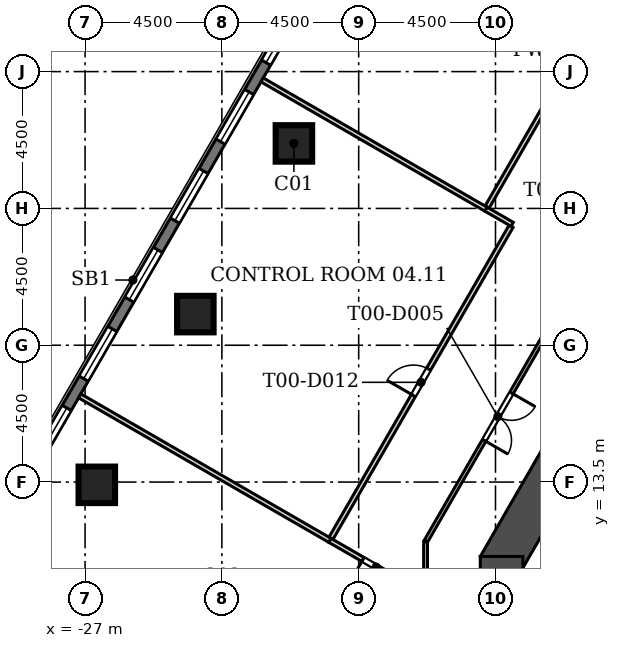
"""IFC4 building model, lengths in metres.
Left out: names, types, materials, properties, quantities, classifications, styles, units other than length and angle.
Written with IfcOpenShell. Run it as: python <this file> out.ifc"""

import sys

from ifc_helpers import new_model, si_unit, direction, frame, frame_2d, origin, origin_2d, place, context, subcontext, project, spatial, rectangle, extrude, element, fill, save


model = new_model("IFC4")
c1 = context("Model", 3, precision=1e-05, world=origin(), true_north=direction((0.0, 1.0)))
c2 = subcontext(c1, "Body", "Model", "MODEL_VIEW")
j1 = project(units=[si_unit("LENGTHUNIT", "METRE"), si_unit("PLANEANGLEUNIT", "RADIAN")], contexts=[c1])
p1 = place(None, origin())
s1 = spatial("IfcSite", under=j1, at=p1, CompositionType="ELEMENT")
p2 = place(p1, origin())
s2 = spatial("IfcBuilding", under=s1, at=p2, CompositionType="ELEMENT")
p3 = place(p2, frame((0.0, 0.0, 25.0)))
s3 = spatial("IfcBuildingStorey", under=s2, at=p3, CompositionType="ELEMENT", Elevation=25.0)
for number, where, z_axis, x_axis in (
    (1, (-20.131, 24.638, 0.0), (0.0, 0.0, 1.0), (1.0, 0.0, 0.0)),
    (2, (-23.373, 19.024, 0.0), (0.0, 0.0, 1.0), (1.0, 0.0, 0.0)),
    (3, (-26.614, 13.409, 0.0), (0.0, 0.0, 1.0), (1.0, 0.0, 0.0)),
):
    element("IfcColumn", number, at=place(p3, frame(where, z_axis=z_axis, x_axis=x_axis)), inside=s3, PredefinedType="COLUMN", context=c2, shape_type="SweptSolid", body=[
        extrude(rectangle(XDim=1.2, YDim=1.2, at=origin_2d()), origin(), (0.0, 0.0, 1.0), 4.5),
    ])
p4 = place(p3, frame((-8.805, 18.65, 0.0), z_axis=(0.0, 0.0, 1.0), x_axis=(-0.50000187635, -0.866024320471, 0.0)))
e4 = element("IfcWall", 4, at=p4, inside=s3, PredefinedType="SHEAR", context=c2, shape_type="SweptSolid", body=[
    extrude(rectangle(XDim=9.177, YDim=1.4, at=frame_2d((4.588, 0.0))), origin(), (0.0, 0.0, 1.0), 4.5),
])
p5 = place(p3, frame((-13.3, 11.052, 0.0), z_axis=(0.0, 0.0, 1.0), x_axis=(0.0, -1.0, 0.0)))
e5 = element("IfcWall", 5, at=p5, inside=s3, PredefinedType="SHEAR", context=c2, shape_type="SweptSolid", body=[
    extrude(rectangle(XDim=10.202, YDim=1.4, at=frame_2d((5.101, 0.0))), origin(), (0.0, 0.0, 1.0), 4.5),
])
p6 = place(p5, frame((5.453, 0.0, 0.0)))
e6 = element("IfcOpeningElement", 6, at=p6, cuts=e5, PredefinedType="OPENING", context=c2, shape_type="SweptSolid", body=[
    extrude(rectangle(XDim=1.2, YDim=2.1, at=frame_2d((0.6, 1.05))), frame((0.0, 0.71, 0.0), z_axis=(0.0, -1.0, 0.0), x_axis=(1.0, 0.0, 0.0)), (0.0, 0.0, 1.0), 1.42),
])
p7 = place(p5, frame((1.453, 0.0, 0.0)))
e7 = element("IfcOpeningElement", 7, at=p7, cuts=e5, PredefinedType="OPENING", context=c2, shape_type="SweptSolid", body=[
    extrude(rectangle(XDim=1.2, YDim=2.1, at=frame_2d((0.6, 1.05))), frame((0.0, 0.71, 0.0), z_axis=(0.0, -1.0, 0.0), x_axis=(1.0, 0.0, 0.0)), (0.0, 0.0, 1.0), 1.42),
])
p8 = place(p3, frame((-4.353, 56.207, 0.0), z_axis=(0.0, 0.0, 1.0), x_axis=(-0.500000836325, -0.866024920931, 0.0)))
e8 = element("IfcWall", 8, at=p8, inside=s3, PredefinedType="SOLIDWALL", context=c2, shape_type="SweptSolid", body=[
    extrude(rectangle(XDim=56.0, YDim=0.34, at=frame_2d((28.0, 0.0))), origin(), (0.0, 0.0, 1.0), 4.2),
])
p9 = place(p8, frame((1.5, 0.0, 0.9)))
e9 = element("IfcOpeningElement", 9, at=p9, cuts=e8, PredefinedType="OPENING", context=c2, shape_type="SweptSolid", body=[
    extrude(rectangle(XDim=1.885, YDim=3.0, at=frame_2d((0.942, 1.5))), frame((0.0, 0.18, 0.0), z_axis=(0.0, -1.0, 0.0), x_axis=(1.0, 0.0, 0.0)), (0.0, 0.0, 1.0), 0.36),
])
p10 = place(p8, frame((4.5, 0.0, 0.9)))
e10 = element("IfcOpeningElement", 10, at=p10, cuts=e8, PredefinedType="OPENING", context=c2, shape_type="SweptSolid", body=[
    extrude(rectangle(XDim=1.885, YDim=3.0, at=frame_2d((0.942, 1.5))), frame((0.0, 0.18, 0.0), z_axis=(0.0, -1.0, 0.0), x_axis=(1.0, 0.0, 0.0)), (0.0, 0.0, 1.0), 0.36),
])
p11 = place(p8, frame((7.5, 0.0, 0.9)))
e11 = element("IfcOpeningElement", 11, at=p11, cuts=e8, PredefinedType="OPENING", context=c2, shape_type="SweptSolid", body=[
    extrude(rectangle(XDim=1.885, YDim=3.0, at=frame_2d((0.942, 1.5))), frame((0.0, 0.18, 0.0), z_axis=(0.0, -1.0, 0.0), x_axis=(1.0, 0.0, 0.0)), (0.0, 0.0, 1.0), 0.36),
])
p12 = place(p8, frame((10.5, 0.0, 0.9)))
e12 = element("IfcOpeningElement", 12, at=p12, cuts=e8, PredefinedType="OPENING", context=c2, shape_type="SweptSolid", body=[
    extrude(rectangle(XDim=1.885, YDim=3.0, at=frame_2d((0.942, 1.5))), frame((0.0, 0.18, 0.0), z_axis=(0.0, -1.0, 0.0), x_axis=(1.0, 0.0, 0.0)), (0.0, 0.0, 1.0), 0.36),
])
p13 = place(p8, frame((13.5, 0.0, 0.9)))
e13 = element("IfcOpeningElement", 13, at=p13, cuts=e8, PredefinedType="OPENING", context=c2, shape_type="SweptSolid", body=[
    extrude(rectangle(XDim=1.885, YDim=3.0, at=frame_2d((0.942, 1.5))), frame((0.0, 0.18, 0.0), z_axis=(0.0, -1.0, 0.0), x_axis=(1.0, 0.0, 0.0)), (0.0, 0.0, 1.0), 0.36),
])
p14 = place(p8, frame((16.5, 0.0, 0.9)))
e14 = element("IfcOpeningElement", 14, at=p14, cuts=e8, PredefinedType="OPENING", context=c2, shape_type="SweptSolid", body=[
    extrude(rectangle(XDim=1.885, YDim=3.0, at=frame_2d((0.942, 1.5))), frame((0.0, 0.18, 0.0), z_axis=(0.0, -1.0, 0.0), x_axis=(1.0, 0.0, 0.0)), (0.0, 0.0, 1.0), 0.36),
])
p15 = place(p8, frame((19.5, 0.0, 0.9)))
e15 = element("IfcOpeningElement", 15, at=p15, cuts=e8, PredefinedType="OPENING", context=c2, shape_type="SweptSolid", body=[
    extrude(rectangle(XDim=1.885, YDim=3.0, at=frame_2d((0.942, 1.5))), frame((0.0, 0.18, 0.0), z_axis=(0.0, -1.0, 0.0), x_axis=(1.0, 0.0, 0.0)), (0.0, 0.0, 1.0), 0.36),
])
p16 = place(p8, frame((22.5, 0.0, 0.9)))
e16 = element("IfcOpeningElement", 16, at=p16, cuts=e8, PredefinedType="OPENING", context=c2, shape_type="SweptSolid", body=[
    extrude(rectangle(XDim=1.885, YDim=3.0, at=frame_2d((0.942, 1.5))), frame((0.0, 0.18, 0.0), z_axis=(0.0, -1.0, 0.0), x_axis=(1.0, 0.0, 0.0)), (0.0, 0.0, 1.0), 0.36),
])
p17 = place(p8, frame((25.5, 0.0, 0.0)))
e17 = element("IfcOpeningElement", 17, at=p17, cuts=e8, PredefinedType="OPENING", context=c2, shape_type="SweptSolid", body=[
    extrude(rectangle(XDim=1.885, YDim=2.6, at=frame_2d((0.942, 1.3))), frame((0.0, 0.18, 0.0), z_axis=(0.0, -1.0, 0.0), x_axis=(1.0, 0.0, 0.0)), (0.0, 0.0, 1.0), 0.36),
])
p18 = place(p8, frame((28.5, 0.0, 0.9)))
e18 = element("IfcOpeningElement", 18, at=p18, cuts=e8, PredefinedType="OPENING", context=c2, shape_type="SweptSolid", body=[
    extrude(rectangle(XDim=1.885, YDim=3.0, at=frame_2d((0.942, 1.5))), frame((0.0, 0.18, 0.0), z_axis=(0.0, -1.0, 0.0), x_axis=(1.0, 0.0, 0.0)), (0.0, 0.0, 1.0), 0.36),
])
p19 = place(p8, frame((31.5, 0.0, 0.9)))
e19 = element("IfcOpeningElement", 19, at=p19, cuts=e8, PredefinedType="OPENING", context=c2, shape_type="SweptSolid", body=[
    extrude(rectangle(XDim=1.885, YDim=3.0, at=frame_2d((0.942, 1.5))), frame((0.0, 0.18, 0.0), z_axis=(0.0, -1.0, 0.0), x_axis=(1.0, 0.0, 0.0)), (0.0, 0.0, 1.0), 0.36),
])
p20 = place(p8, frame((34.5, 0.0, 0.9)))
e20 = element("IfcOpeningElement", 20, at=p20, cuts=e8, PredefinedType="OPENING", context=c2, shape_type="SweptSolid", body=[
    extrude(rectangle(XDim=1.885, YDim=3.0, at=frame_2d((0.942, 1.5))), frame((0.0, 0.18, 0.0), z_axis=(0.0, -1.0, 0.0), x_axis=(1.0, 0.0, 0.0)), (0.0, 0.0, 1.0), 0.36),
])
p21 = place(p8, frame((37.5, 0.0, 0.9)))
e21 = element("IfcOpeningElement", 21, at=p21, cuts=e8, PredefinedType="OPENING", context=c2, shape_type="SweptSolid", body=[
    extrude(rectangle(XDim=1.885, YDim=3.0, at=frame_2d((0.942, 1.5))), frame((0.0, 0.18, 0.0), z_axis=(0.0, -1.0, 0.0), x_axis=(1.0, 0.0, 0.0)), (0.0, 0.0, 1.0), 0.36),
])
p22 = place(p8, frame((40.5, 0.0, 0.9)))
e22 = element("IfcOpeningElement", 22, at=p22, cuts=e8, PredefinedType="OPENING", context=c2, shape_type="SweptSolid", body=[
    extrude(rectangle(XDim=1.885, YDim=3.0, at=frame_2d((0.942, 1.5))), frame((0.0, 0.18, 0.0), z_axis=(0.0, -1.0, 0.0), x_axis=(1.0, 0.0, 0.0)), (0.0, 0.0, 1.0), 0.36),
])
p23 = place(p8, frame((43.5, 0.0, 0.9)))
e23 = element("IfcOpeningElement", 23, at=p23, cuts=e8, PredefinedType="OPENING", context=c2, shape_type="SweptSolid", body=[
    extrude(rectangle(XDim=1.885, YDim=3.0, at=frame_2d((0.942, 1.5))), frame((0.0, 0.18, 0.0), z_axis=(0.0, -1.0, 0.0), x_axis=(1.0, 0.0, 0.0)), (0.0, 0.0, 1.0), 0.36),
])
p24 = place(p8, frame((46.5, 0.0, 0.9)))
e24 = element("IfcOpeningElement", 24, at=p24, cuts=e8, PredefinedType="OPENING", context=c2, shape_type="SweptSolid", body=[
    extrude(rectangle(XDim=1.885, YDim=3.0, at=frame_2d((0.942, 1.5))), frame((0.0, 0.18, 0.0), z_axis=(0.0, -1.0, 0.0), x_axis=(1.0, 0.0, 0.0)), (0.0, 0.0, 1.0), 0.36),
])
p25 = place(p8, frame((49.5, 0.0, 0.9)))
e25 = element("IfcOpeningElement", 25, at=p25, cuts=e8, PredefinedType="OPENING", context=c2, shape_type="SweptSolid", body=[
    extrude(rectangle(XDim=1.885, YDim=3.0, at=frame_2d((0.942, 1.5))), frame((0.0, 0.18, 0.0), z_axis=(0.0, -1.0, 0.0), x_axis=(1.0, 0.0, 0.0)), (0.0, 0.0, 1.0), 0.36),
])
p26 = place(p8, frame((52.5, 0.0, 0.9)))
e26 = element("IfcOpeningElement", 26, at=p26, cuts=e8, PredefinedType="OPENING", context=c2, shape_type="SweptSolid", body=[
    extrude(rectangle(XDim=1.885, YDim=3.0, at=frame_2d((0.942, 1.5))), frame((0.0, 0.18, 0.0), z_axis=(0.0, -1.0, 0.0), x_axis=(1.0, 0.0, 0.0)), (0.0, 0.0, 1.0), 0.36),
])
p27 = place(p3, frame((-15.8, 9.766, 0.0), z_axis=(0.0, 0.0, 1.0), x_axis=(0.0, 1.0, 0.0)))
e27 = element("IfcWall", 27, at=p27, inside=s3, PredefinedType="PARTITIONING", context=c2, shape_type="SweptSolid", body=[
    extrude(rectangle(XDim=1.769, YDim=0.125, at=frame_2d((0.885, 0.0))), origin(), (0.0, 0.0, 1.0), 4.2),
])
p28 = place(p3, frame((-15.784, 11.562, 0.0), z_axis=(0.0, 0.0, 1.0), x_axis=(0.500006656899, 0.866021560388, 0.0)))
e28 = element("IfcWall", 28, at=p28, inside=s3, PredefinedType="PARTITIONING", context=c2, shape_type="SweptSolid", body=[
    extrude(rectangle(XDim=9.444, YDim=0.125, at=frame_2d((4.722, 0.0))), origin(), (0.0, 0.0, 1.0), 4.2),
])
p29 = place(p28, frame((3.822, 0.0, 0.0)))
e29 = element("IfcOpeningElement", 29, at=p29, cuts=e28, PredefinedType="OPENING", context=c2, shape_type="SweptSolid", body=[
    extrude(rectangle(XDim=1.8, YDim=2.1, at=frame_2d((0.9, 1.05))), frame((0.0, 0.073, 0.0), z_axis=(0.0, -1.0, 0.0), x_axis=(1.0, 0.0, 0.0)), (0.0, 0.0, 1.0), 0.145),
])
p30 = place(p3, frame((-13.778, 22.542, 0.0), z_axis=(0.0, 0.0, 1.0), x_axis=(0.500001258315, 0.866024677295, 0.0)))
e30 = element("IfcWall", 30, at=p30, inside=s3, PredefinedType="PARTITIONING", context=c2, shape_type="SweptSolid", body=[
    extrude(rectangle(XDim=11.85, YDim=0.15, at=frame_2d((5.925, 0.0))), origin(), (0.0, 0.0, 1.0), 4.2),
])
p31 = place(p3, frame((-18.912, 11.649, 0.0), z_axis=(0.0, 0.0, 1.0), x_axis=(0.500010179592, 0.866019526514, 0.0)))
e31 = element("IfcWall", 31, at=p31, inside=s3, PredefinedType="PARTITIONING", context=c2, shape_type="SweptSolid", body=[
    extrude(rectangle(XDim=11.85, YDim=0.15, at=frame_2d((5.925, 0.0))), origin(), (0.0, 0.0, 1.0), 4.2),
])
p32 = place(p31, frame((5.425, 0.0, 0.0)))
e32 = element("IfcOpeningElement", 32, at=p32, cuts=e31, PredefinedType="OPENING", context=c2, shape_type="SweptSolid", body=[
    extrude(rectangle(XDim=1.0, YDim=2.1, at=frame_2d((0.5, 1.05))), frame((0.0, 0.085, 0.0), z_axis=(0.0, -1.0, 0.0), x_axis=(1.0, 0.0, 0.0)), (0.0, 0.0, 1.0), 0.17),
])
p33 = place(p3, frame((-12.95, 21.977, 0.0), z_axis=(0.0, 0.0, 1.0), x_axis=(-0.866010750942, 0.50002537861, 0.0)))
e33 = element("IfcWall", 33, at=p33, inside=s3, PredefinedType="PARTITIONING", context=c2, shape_type="SweptSolid", body=[
    extrude(rectangle(XDim=1.0, YDim=0.15, at=frame_2d((0.5, 0.0))), origin(), (0.0, 0.0, 1.0), 4.2),
])
p34 = place(p3, frame((-15.9, 9.824, 0.0), z_axis=(0.0, 0.0, 1.0), x_axis=(-0.866058575552, 0.499942540411, 0.0)))
e34 = element("IfcWall", 34, at=p34, inside=s3, PredefinedType="PARTITIONING", context=c2, shape_type="SweptSolid", body=[
    extrude(rectangle(XDim=3.521, YDim=0.15, at=frame_2d((1.76, 0.0))), origin(), (0.0, 0.0, 1.0), 4.2),
])
p35 = place(p34, frame((1.26, 0.0, 0.0)))
e35 = element("IfcOpeningElement", 35, at=p35, cuts=e34, PredefinedType="OPENING", context=c2, shape_type="SweptSolid", body=[
    extrude(rectangle(XDim=1.0, YDim=2.1, at=frame_2d((0.5, 1.05))), frame((0.0, 0.085, 0.0), z_axis=(0.0, -1.0, 0.0), x_axis=(1.0, 0.0, 0.0)), (0.0, 0.0, 1.0), 0.17),
])
p36 = place(p3, frame((-13.816, 22.477, 0.0), z_axis=(0.0, 0.0, 1.0), x_axis=(-0.866021522889, 0.500006721848, 0.0)))
e36 = element("IfcWall", 36, at=p36, inside=s3, PredefinedType="PARTITIONING", context=c2, shape_type="SweptSolid", body=[
    extrude(rectangle(XDim=8.5, YDim=0.15, at=frame_2d((4.25, 0.0))), origin(), (0.0, 0.0, 1.0), 4.2),
])
p37 = place(p3, frame((-18.95, 11.584, 0.0), z_axis=(0.0, 0.0, 1.0), x_axis=(-0.866020389056, 0.500008685663, 0.0)))
e37 = element("IfcWall", 37, at=p37, inside=s3, PredefinedType="PARTITIONING", context=c2, shape_type="SweptSolid", body=[
    extrude(rectangle(XDim=9.5, YDim=0.15, at=frame_2d((4.75, 0.0))), origin(), (0.0, 0.0, 1.0), 4.2),
])
p38 = place(p19, origin())
e38 = element("IfcWindow", 38, at=p38, inside=s3, PartitioningType="SINGLE_PANEL", PredefinedType="WINDOW", context=c2, shape_type="SweptSolid", body=[
    extrude(rectangle(XDim=1.885, YDim=3.0, at=frame_2d((0.942, 1.5))), frame((0.0, 0.11, 0.0), z_axis=(0.0, -1.0, 0.0), x_axis=(1.0, 0.0, 0.0)), (0.0, 0.0, 1.0), 0.06),
])
fill(e19, e38)
p39 = place(p20, origin())
e39 = element("IfcWindow", 39, at=p39, inside=s3, PartitioningType="SINGLE_PANEL", PredefinedType="WINDOW", context=c2, shape_type="SweptSolid", body=[
    extrude(rectangle(XDim=1.885, YDim=3.0, at=frame_2d((0.942, 1.5))), frame((0.0, 0.11, 0.0), z_axis=(0.0, -1.0, 0.0), x_axis=(1.0, 0.0, 0.0)), (0.0, 0.0, 1.0), 0.06),
])
fill(e20, e39)
p40 = place(p21, origin())
e40 = element("IfcWindow", 40, at=p40, inside=s3, PartitioningType="SINGLE_PANEL", PredefinedType="WINDOW", context=c2, shape_type="SweptSolid", body=[
    extrude(rectangle(XDim=1.885, YDim=3.0, at=frame_2d((0.942, 1.5))), frame((0.0, 0.11, 0.0), z_axis=(0.0, -1.0, 0.0), x_axis=(1.0, 0.0, 0.0)), (0.0, 0.0, 1.0), 0.06),
])
fill(e21, e40)
p41 = place(p22, origin())
e41 = element("IfcWindow", 41, at=p41, inside=s3, PartitioningType="SINGLE_PANEL", PredefinedType="WINDOW", context=c2, shape_type="SweptSolid", body=[
    extrude(rectangle(XDim=1.885, YDim=3.0, at=frame_2d((0.942, 1.5))), frame((0.0, 0.11, 0.0), z_axis=(0.0, -1.0, 0.0), x_axis=(1.0, 0.0, 0.0)), (0.0, 0.0, 1.0), 0.06),
])
fill(e22, e41)
p42 = place(p23, origin())
e42 = element("IfcWindow", 42, at=p42, inside=s3, PartitioningType="SINGLE_PANEL", PredefinedType="WINDOW", context=c2, shape_type="SweptSolid", body=[
    extrude(rectangle(XDim=1.885, YDim=3.0, at=frame_2d((0.942, 1.5))), frame((0.0, 0.11, 0.0), z_axis=(0.0, -1.0, 0.0), x_axis=(1.0, 0.0, 0.0)), (0.0, 0.0, 1.0), 0.06),
])
fill(e23, e42)
p43 = place(p24, origin())
e43 = element("IfcWindow", 43, at=p43, inside=s3, PartitioningType="SINGLE_PANEL", PredefinedType="WINDOW", context=c2, shape_type="SweptSolid", body=[
    extrude(rectangle(XDim=1.885, YDim=3.0, at=frame_2d((0.942, 1.5))), frame((0.0, 0.11, 0.0), z_axis=(0.0, -1.0, 0.0), x_axis=(1.0, 0.0, 0.0)), (0.0, 0.0, 1.0), 0.06),
])
fill(e24, e43)
p44 = place(p29, frame((1.8, 0.0, 0.0), z_axis=(0.0, 0.0, 1.0), x_axis=(-1.0, 0.0, 0.0)))
e44 = element("IfcDoor", 44, at=p44, inside=s3, OperationType="DOUBLE_DOOR_SINGLE_SWING", PredefinedType="DOOR", context=c2, shape_type="SweptSolid", body=[
    extrude(rectangle(XDim=1.8, YDim=2.1, at=frame_2d((0.9, 1.05))), frame((0.0, 0.025, 0.0), z_axis=(0.0, -1.0, 0.0), x_axis=(1.0, 0.0, 0.0)), (0.0, 0.0, 1.0), 0.05),
])
fill(e29, e44)
p45 = place(p32, origin())
e45 = element("IfcDoor", 45, at=p45, inside=s3, OperationType="SINGLE_SWING_LEFT", PredefinedType="DOOR", context=c2, shape_type="SweptSolid", body=[
    extrude(rectangle(XDim=1.0, YDim=2.1, at=frame_2d((0.5, 1.05))), frame((0.0, 0.025, 0.0), z_axis=(0.0, -1.0, 0.0), x_axis=(1.0, 0.0, 0.0)), (0.0, 0.0, 1.0), 0.05),
])
fill(e32, e45)
p46 = place(p35, origin())
e46 = element("IfcDoor", 46, at=p46, inside=s3, OperationType="SINGLE_SWING_RIGHT", PredefinedType="DOOR", context=c2, shape_type="SweptSolid", body=[
    extrude(rectangle(XDim=1.0, YDim=2.1, at=frame_2d((0.5, 1.05))), frame((0.0, 0.025, 0.0), z_axis=(0.0, -1.0, 0.0), x_axis=(1.0, 0.0, 0.0)), (0.0, 0.0, 1.0), 0.05),
])
fill(e35, e46)
save(model, sys.argv[1])
